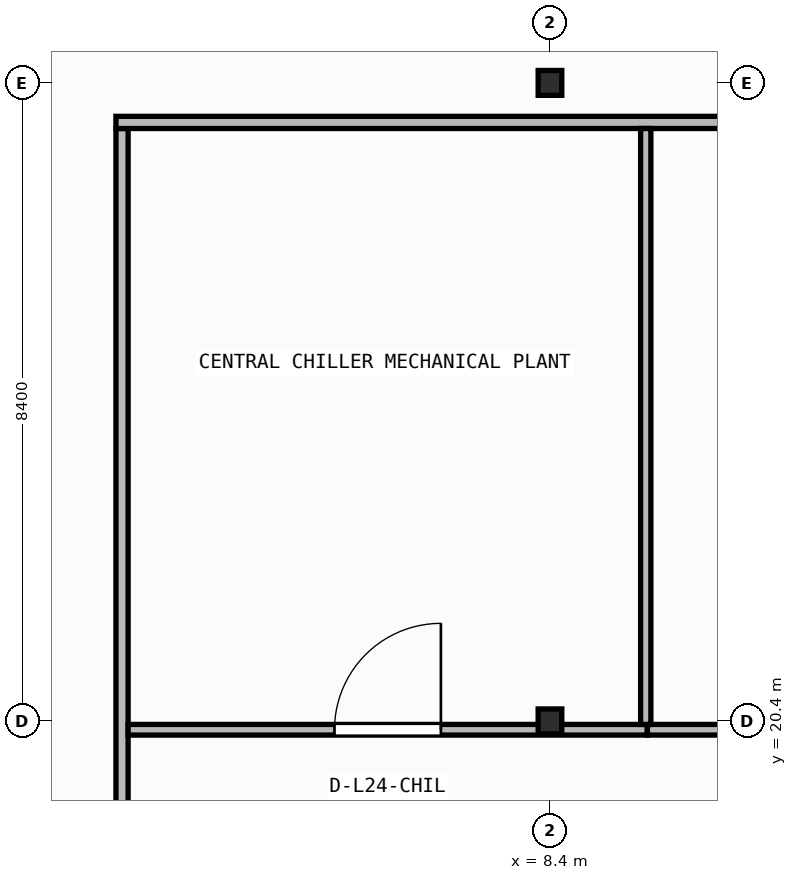
"""IFC4 building model, lengths in metres.
Left out: names, types, materials, properties, quantities, classifications, styles, units other than length and angle.
Written with IfcOpenShell. Run it as: python <this file> out.ifc"""

import sys

from ifc_helpers import new_model, si_unit, direction, frame, frame_2d, origin, origin_2d, place, context, subcontext, project, spatial, rectangle, i_section, extrude, element, fill, save


model = new_model("IFC4")
c1 = context("Model", 3, precision=1e-05, world=origin(), true_north=direction((0.0, 1.0)))
c2 = subcontext(c1, "Body", "Model", "MODEL_VIEW")
j1 = project(units=[si_unit("LENGTHUNIT", "METRE"), si_unit("PLANEANGLEUNIT", "RADIAN")], contexts=[c1])
p1 = place(None, origin())
s1 = spatial("IfcSite", under=j1, at=p1, CompositionType="ELEMENT")
p2 = place(p1, origin())
s2 = spatial("IfcBuilding", under=s1, at=p2, CompositionType="ELEMENT")
p3 = place(p2, frame((0.0, 0.0, 97.55)))
s3 = spatial("IfcBuildingStorey", under=s2, at=p3, CompositionType="ELEMENT", Elevation=97.55)
for number, where, z_axis, x_axis in (
    (1, (8.4, 20.4, 0.0), (0.0, 0.0, 1.0), (1.0, 0.0, 0.0)),
    (2, (8.4, 28.8, 0.0), (0.0, 0.0, 1.0), (1.0, 0.0, 0.0)),
):
    element("IfcColumn", number, at=place(p3, frame(where, z_axis=z_axis, x_axis=x_axis)), inside=s3, PredefinedType="COLUMN", context=c2, shape_type="SweptSolid", body=[
        extrude(i_section(OverallWidth=0.311, OverallDepth=0.327, WebThickness=0.016, FlangeThickness=0.025, FilletRadius=0.017, at=origin_2d()), origin(), (0.0, 0.0, 1.0), 5.8),
    ])
p4 = place(p3, frame((2.77, 12.16, 0.0), z_axis=(0.0, 0.0, 1.0), x_axis=(0.0, 1.0, 0.0)))
e3 = element("IfcWall", 3, at=p4, inside=s3, PredefinedType="PARTITIONING", context=c2, shape_type="SweptSolid", body=[
    extrude(rectangle(XDim=16.04, YDim=0.16, at=frame_2d((8.02, 0.0))), origin(), (0.0, 0.0, 1.0), 5.56),
])
p5 = place(p3, frame((2.69, 28.28, 0.0), z_axis=(0.0, 0.0, 1.0), x_axis=(1.0, 0.0, 0.0)))
e4 = element("IfcWall", 4, at=p5, inside=s3, PredefinedType="PARTITIONING", context=c2, shape_type="SweptSolid", body=[
    extrude(rectangle(XDim=41.19, YDim=0.16, at=frame_2d((20.595, 0.0))), origin(), (0.0, 0.0, 1.0), 5.56),
])
p6 = place(p3, frame((2.85, 20.29, 0.0), z_axis=(0.0, 0.0, 1.0), x_axis=(1.0, 0.0, 0.0)))
e5 = element("IfcWall", 5, at=p6, inside=s3, PredefinedType="PARTITIONING", context=c2, shape_type="SweptSolid", body=[
    extrude(rectangle(XDim=6.83, YDim=0.14, at=frame_2d((3.415, 0.0))), origin(), (0.0, 0.0, 1.0), 4.835),
])
p7 = place(p6, frame((2.715, 0.0, 0.0)))
e6 = element("IfcOpeningElement", 6, at=p7, cuts=e5, PredefinedType="OPENING", context=c2, shape_type="SweptSolid", body=[
    extrude(rectangle(XDim=1.4, YDim=2.15, at=frame_2d((0.7, 1.075))), frame((0.0, 0.08, 0.0), z_axis=(0.0, -1.0, 0.0), x_axis=(1.0, 0.0, 0.0)), (0.0, 0.0, 1.0), 0.16),
])
p8 = place(p3, frame((9.682, 20.29, 0.0), z_axis=(0.0, 0.0, 1.0), x_axis=(1.0, 0.0, 0.0)))
e7 = element("IfcWall", 7, at=p8, inside=s3, PredefinedType="PARTITIONING", context=c2, shape_type="SweptSolid", body=[
    extrude(rectangle(XDim=6.798, YDim=0.14, at=frame_2d((3.399, 0.0))), origin(), (0.0, 0.0, 1.0), 4.835),
])
p9 = place(p8, frame((2.688, 0.0, 0.0)))
e8 = element("IfcOpeningElement", 8, at=p9, cuts=e7, PredefinedType="OPENING", context=c2, shape_type="SweptSolid", body=[
    extrude(rectangle(XDim=1.4, YDim=2.15, at=frame_2d((0.7, 1.075))), frame((0.0, 0.08, 0.0), z_axis=(0.0, -1.0, 0.0), x_axis=(1.0, 0.0, 0.0)), (0.0, 0.0, 1.0), 0.16),
])
p10 = place(p3, frame((9.66, 20.36, 0.0), z_axis=(0.0, 0.0, 1.0), x_axis=(0.0, 1.0, 0.0)))
e9 = element("IfcWall", 9, at=p10, inside=s3, PredefinedType="PARTITIONING", context=c2, shape_type="SweptSolid", body=[
    extrude(rectangle(XDim=7.84, YDim=0.135, at=frame_2d((3.92, 0.0))), origin(), (0.0, 0.0, 1.0), 5.56),
])
p11 = place(p7, origin())
e10 = element("IfcDoor", 10, at=p11, inside=s3, OperationType="SINGLE_SWING_RIGHT", PredefinedType="DOOR", context=c2, shape_type="SweptSolid", body=[
    extrude(rectangle(XDim=1.4, YDim=2.15, at=frame_2d((0.7, 1.075))), frame((0.0, 0.025, 0.0), z_axis=(0.0, -1.0, 0.0), x_axis=(1.0, 0.0, 0.0)), (0.0, 0.0, 1.0), 0.05),
])
fill(e6, e10)
save(model, sys.argv[1])
